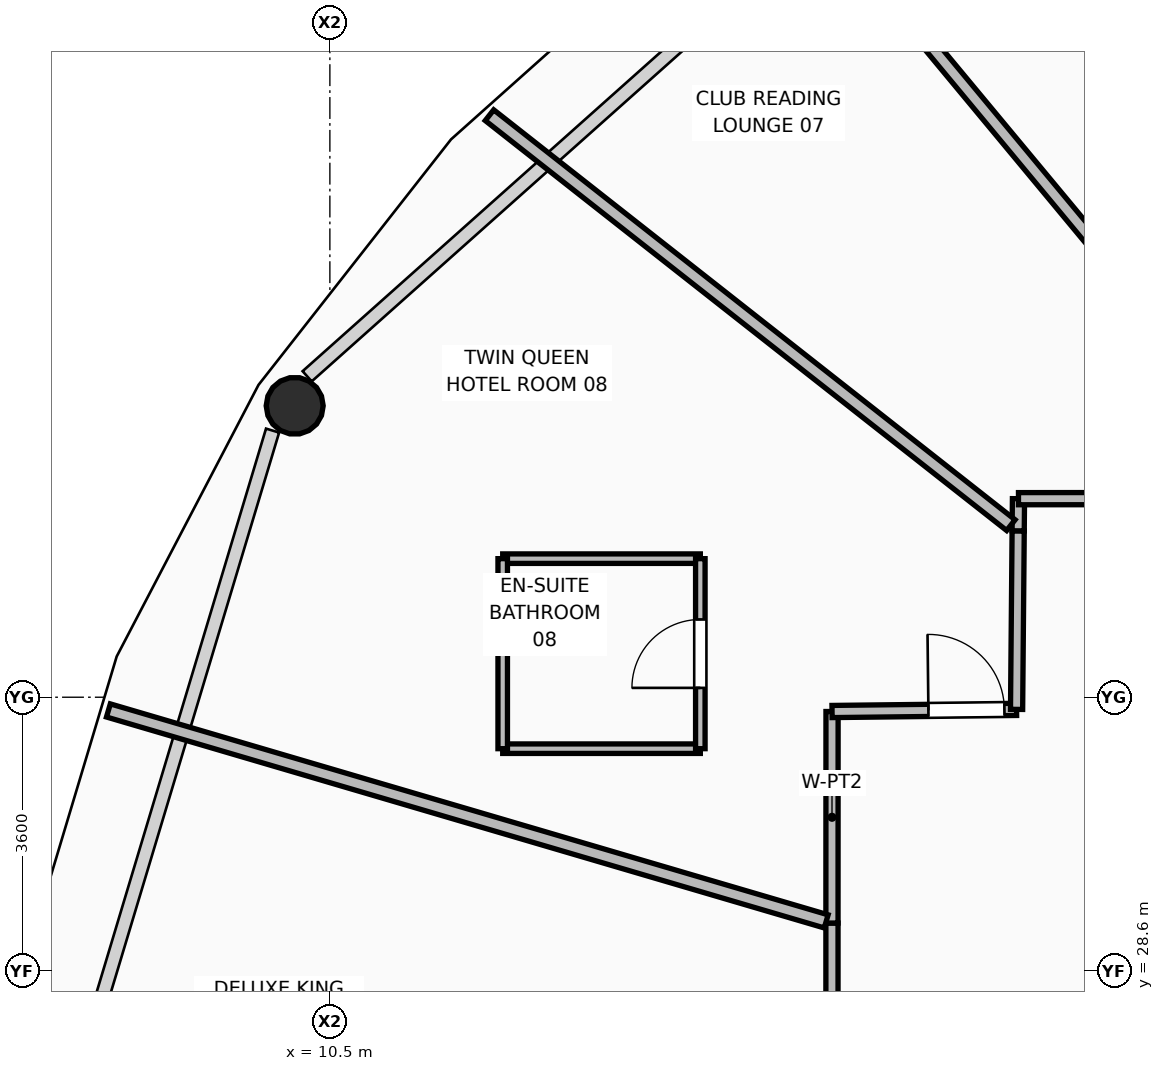
"""IFC4 building model, lengths in metres.
Left out: names, types, materials, properties, quantities, classifications, styles, units other than length and angle.
Written with IfcOpenShell. Run it as: python <this file> out.ifc"""

import sys

from ifc_helpers import new_model, si_unit, direction, frame, frame_2d, origin, origin_2d, place, context, subcontext, project, spatial, rectangle, hollow_circle, extrude, element, fill, save


model = new_model("IFC4")
c1 = context("Model", 3, precision=1e-05, world=origin(), true_north=direction((0.0, 1.0)))
c2 = subcontext(c1, "Body", "Model", "MODEL_VIEW")
j1 = project(units=[si_unit("LENGTHUNIT", "METRE"), si_unit("PLANEANGLEUNIT", "RADIAN")], contexts=[c1])
p1 = place(None, origin())
s1 = spatial("IfcSite", under=j1, at=p1, CompositionType="ELEMENT")
p2 = place(p1, origin())
s2 = spatial("IfcBuilding", under=s1, at=p2, CompositionType="ELEMENT")
p3 = place(p2, frame((0.0, 0.0, 153.45)))
s3 = spatial("IfcBuildingStorey", under=s2, at=p3, CompositionType="ELEMENT", Elevation=153.45)
p4 = place(p3, frame((10.037, 36.034, 0.0), z_axis=(0.0, 0.0, 1.0), x_axis=(1.0, 0.0, 0.0)))
e1 = element("IfcColumn", 1, at=p4, inside=s3, PredefinedType="COLUMN", context=c2, shape_type="SweptSolid", body=[
    extrude(hollow_circle(Radius=0.375, WallThickness=0.035, at=origin_2d()), origin(), (0.0, 0.0, 1.0), 3.57),
])
p5 = place(p3, frame((17.106, 26.142, 0.0), z_axis=(0.0, 0.0, 1.0), x_axis=(0.0, 1.0, 0.0)))
e2 = element("IfcWall", 2, at=p5, inside=s3, PredefinedType="PARTITIONING", context=c2, shape_type="SweptSolid", body=[
    extrude(rectangle(XDim=3.087, YDim=0.16, at=frame_2d((1.543, 0.0))), origin(), (0.0, 0.0, 1.0), 3.55),
])
p6 = place(p3, frame((17.106, 29.229, 0.0), z_axis=(0.0, 0.0, 1.0), x_axis=(0.000350907953, 0.999999938432, 0.0)))
e3 = element("IfcWall", 3, at=p6, inside=s3, PredefinedType="PARTITIONING", context=c2, shape_type="SweptSolid", body=[
    extrude(rectangle(XDim=2.783, YDim=0.16, at=frame_2d((1.392, 0.0))), origin(), (0.0, 0.0, 1.0), 3.55),
])
p7 = place(p3, frame((17.107, 32.012, 0.0), z_axis=(0.0, 0.0, 1.0), x_axis=(0.999933148284, 0.011562826752, 0.0)))
e4 = element("IfcWall", 4, at=p7, inside=s3, PredefinedType="PARTITIONING", context=c2, shape_type="SweptSolid", body=[
    extrude(rectangle(XDim=2.428, YDim=0.16, at=frame_2d((1.214, 0.0))), origin(), (0.0, 0.0, 1.0), 3.55),
])
p8 = place(p7, frame((1.268, 0.0, 0.0)))
e5 = element("IfcOpeningElement", 5, at=p8, cuts=e4, PredefinedType="OPENING", context=c2, shape_type="SweptSolid", body=[
    extrude(rectangle(XDim=1.0, YDim=2.1, at=frame_2d((0.5, 1.05))), frame((0.0, 0.09, 0.0), z_axis=(0.0, -1.0, 0.0), x_axis=(1.0, 0.0, 0.0)), (0.0, 0.0, 1.0), 0.18),
])
p9 = place(p3, frame((19.535, 32.04, 0.0), z_axis=(0.0, 0.0, 1.0), x_axis=(0.008938422662, 0.999960051502, 0.0)))
e6 = element("IfcWall", 6, at=p9, inside=s3, PredefinedType="PARTITIONING", context=c2, shape_type="SweptSolid", body=[
    extrude(rectangle(XDim=2.349, YDim=0.16, at=frame_2d((1.174, 0.0))), origin(), (0.0, 0.0, 1.0), 3.006),
])
p10 = place(p3, frame((19.556, 34.389, 0.0), z_axis=(0.0, 0.0, 1.0), x_axis=(0.009809106822, 0.999951889554, 0.0)))
e7 = element("IfcWall", 7, at=p10, inside=s3, PredefinedType="PARTITIONING", context=c2, shape_type="SweptSolid", body=[
    extrude(rectangle(XDim=0.423, YDim=0.16, at=frame_2d((0.211, 0.0))), origin(), (0.0, 0.0, 1.0), 3.55),
])
p11 = place(p3, frame((19.56, 34.812, 0.0), z_axis=(0.0, 0.0, 1.0), x_axis=(0.999999867217, 0.000515331032, 0.0)))
e8 = element("IfcWall", 8, at=p11, inside=s3, PredefinedType="PARTITIONING", context=c2, shape_type="SweptSolid", body=[
    extrude(rectangle(XDim=3.79, YDim=0.16, at=frame_2d((1.895, 0.0))), origin(), (0.0, 0.0, 1.0), 3.006),
])
p12 = place(p11, frame((2.049, 0.0, 0.0)))
e9 = element("IfcOpeningElement", 9, at=p12, cuts=e8, PredefinedType="OPENING", context=c2, shape_type="SweptSolid", body=[
    extrude(rectangle(XDim=1.0, YDim=2.1, at=frame_2d((0.5, 1.05))), frame((0.0, 0.09, 0.0), z_axis=(0.0, -1.0, 0.0), x_axis=(1.0, 0.0, 0.0)), (0.0, 0.0, 1.0), 0.18),
])
p13 = place(p3, frame((24.842, 36.815, 0.0), z_axis=(0.0, 0.0, 1.0), x_axis=(-0.490895094361, 0.871218690302, 0.0)))
e10 = element("IfcWall", 10, at=p13, inside=s3, PredefinedType="PARTITIONING", context=c2, shape_type="SweptSolid", body=[
    extrude(rectangle(XDim=9.452, YDim=0.18, at=frame_2d((4.726, 0.0))), origin(), (0.0, 0.0, 1.0), 2.852),
])
p14 = place(p3, frame((23.288, 34.89, 0.0), z_axis=(0.0, 0.0, 1.0), x_axis=(-0.638821611384, 0.76935489134, 0.0)))
e11 = element("IfcWall", 11, at=p14, inside=s3, PredefinedType="PARTITIONING", context=c2, shape_type="SweptSolid", body=[
    extrude(rectangle(XDim=10.581, YDim=0.18, at=frame_2d((5.29, 0.0))), origin(), (0.0, 0.0, 1.0), 2.852),
])
p15 = place(p3, frame((19.46, 34.464, 0.0), z_axis=(0.0, 0.0, 1.0), x_axis=(-0.786155203297, 0.618029122558, 0.0)))
e12 = element("IfcWall", 12, at=p15, inside=s3, PredefinedType="PARTITIONING", context=c2, shape_type="SweptSolid", body=[
    extrude(rectangle(XDim=8.726, YDim=0.18, at=frame_2d((4.363, 0.0))), origin(), (0.0, 0.0, 1.0), 2.852),
])
p16 = place(p3, frame((17.03, 29.251, 0.0), z_axis=(0.0, 0.0, 1.0), x_axis=(-0.959441691332, 0.281907149489, 0.0)))
e13 = element("IfcWall", 13, at=p16, inside=s3, PredefinedType="PARTITIONING", context=c2, shape_type="SweptSolid", body=[
    extrude(rectangle(XDim=9.843, YDim=0.18, at=frame_2d((4.922, 0.0))), origin(), (0.0, 0.0, 1.0), 2.852),
])
for number, where, z_axis, x_axis in (
    (14, (12.774, 31.523, 0.0), (0.0, 0.0, 1.0), (1.0, 0.0, 0.0)),
    (15, (12.774, 34.023, 0.0), (0.0, 0.0, 1.0), (1.0, 0.0, 0.0)),
):
    element("IfcWall", number, at=place(p3, frame(where, z_axis=z_axis, x_axis=x_axis)), inside=s3, PredefinedType="PARTITIONING", context=c2, shape_type="SweptSolid", body=[
        extrude(rectangle(XDim=2.6, YDim=0.125, at=frame_2d((1.3, 0.0))), origin(), (0.0, 0.0, 1.0), 3.55),
    ])
p17 = place(p3, frame((12.774, 31.523, 0.0), z_axis=(0.0, 0.0, 1.0), x_axis=(0.0, 1.0, 0.0)))
e16 = element("IfcWall", 16, at=p17, inside=s3, PredefinedType="PARTITIONING", context=c2, shape_type="SweptSolid", body=[
    extrude(rectangle(XDim=2.5, YDim=0.125, at=frame_2d((1.25, 0.0))), origin(), (0.0, 0.0, 1.0), 3.55),
])
p18 = place(p3, frame((15.374, 31.523, 0.0), z_axis=(0.0, 0.0, 1.0), x_axis=(0.0, 1.0, 0.0)))
e17 = element("IfcWall", 17, at=p18, inside=s3, PredefinedType="PARTITIONING", context=c2, shape_type="SweptSolid", body=[
    extrude(rectangle(XDim=2.5, YDim=0.125, at=frame_2d((1.25, 0.0))), origin(), (0.0, 0.0, 1.0), 3.55),
])
p19 = place(p18, frame((0.8, 0.0, 0.0)))
e18 = element("IfcOpeningElement", 18, at=p19, cuts=e17, PredefinedType="OPENING", context=c2, shape_type="SweptSolid", body=[
    extrude(rectangle(XDim=0.9, YDim=2.1, at=frame_2d((0.45, 1.05))), frame((0.0, 0.073, 0.0), z_axis=(0.0, -1.0, 0.0), x_axis=(1.0, 0.0, 0.0)), (0.0, 0.0, 1.0), 0.145),
])
p20 = place(p19, origin())
e19 = element("IfcDoor", 19, at=p20, inside=s3, OperationType="SINGLE_SWING_LEFT", PredefinedType="DOOR", context=c2, shape_type="SweptSolid", body=[
    extrude(rectangle(XDim=0.9, YDim=2.1, at=frame_2d((0.45, 1.05))), frame((0.0, 0.025, 0.0), z_axis=(0.0, -1.0, 0.0), x_axis=(1.0, 0.0, 0.0)), (0.0, 0.0, 1.0), 0.05),
])
fill(e18, e19)
p21 = place(p8, origin())
e20 = element("IfcDoor", 20, at=p21, inside=s3, OperationType="SINGLE_SWING_LEFT", PredefinedType="DOOR", context=c2, shape_type="SweptSolid", body=[
    extrude(rectangle(XDim=1.0, YDim=2.1, at=frame_2d((0.5, 1.05))), frame((0.0, 0.025, 0.0), z_axis=(0.0, -1.0, 0.0), x_axis=(1.0, 0.0, 0.0)), (0.0, 0.0, 1.0), 0.05),
])
fill(e5, e20)
save(model, sys.argv[1])
